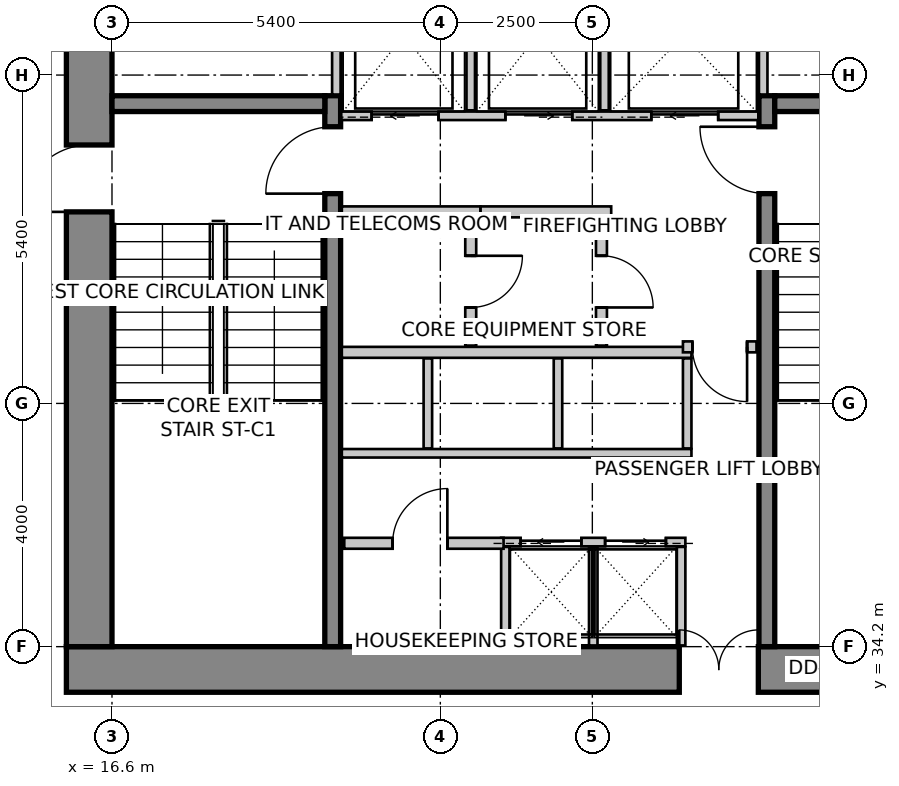
"""IFC4 building model, lengths in metres.
Left out: names, types, materials, properties, quantities, classifications, styles, units other than length and angle.
Written with IfcOpenShell. Run it as: python <this file> out.ifc"""

import sys

from ifc_helpers import new_model, si_unit, direction, frame, frame_2d, origin, place, context, subcontext, project, spatial, rectangle, extrude, source, transform, mapped, element, fill, save


model = new_model("IFC4")
c1 = context("Model", 3, precision=1e-05, world=origin(), true_north=direction((0.0, 1.0)))
c2 = subcontext(c1, "Body", "Model", "MODEL_VIEW")
j1 = project(units=[si_unit("LENGTHUNIT", "METRE"), si_unit("PLANEANGLEUNIT", "RADIAN")], contexts=[c1])
p1 = place(None, origin())
s1 = spatial("IfcSite", under=j1, at=p1, CompositionType="ELEMENT")
p2 = place(p1, origin())
s2 = spatial("IfcBuilding", under=s1, at=p2, CompositionType="ELEMENT")
p3 = place(p2, frame((0.0, 0.0, 168.2)))
s3 = spatial("IfcBuildingStorey", under=s2, at=p3, CompositionType="ELEMENT", Elevation=168.2)
p4 = place(p3, frame((15.85, 33.825, 0.0), z_axis=(0.0, 0.0, 1.0), x_axis=(1.0, 0.0, 0.0)))
e1 = element("IfcWall", 1, at=p4, inside=s3, PredefinedType="SHEAR", context=c2, shape_type="SweptSolid", body=[
    extrude(rectangle(XDim=15.9, YDim=0.75, at=frame_2d((7.95, 0.0))), origin(), (0.0, 0.0, 1.0), 3.6),
])
m1 = source(origin(), c2, "Body", "SweptSolid", [
    extrude(rectangle(XDim=1.3, YDim=2.15, at=frame_2d((0.65, 1.075))), frame((0.0, 0.385, 0.0), z_axis=(0.0, -1.0, 0.0), x_axis=(1.0, 0.0, 0.0)), (0.0, 0.0, 1.0), 0.77),
])
p5 = place(p4, frame((10.08, 0.0, 0.0)))
e2 = element("IfcOpeningElement", 2, at=p5, cuts=e1, PredefinedType="OPENING", context=c2, shape_type="MappedRepresentation", body=[
    mapped(m1, transform((0.0, 0.0, 0.0), scale=1.0)),
])
p6 = place(p3, frame((16.225, 34.2, 0.0), z_axis=(0.0, 0.0, 1.0), x_axis=(0.0, 1.0, 0.0)))
e3 = element("IfcWall", 3, at=p6, inside=s3, PredefinedType="SHEAR", context=c2, shape_type="SweptSolid", body=[
    extrude(rectangle(XDim=11.4, YDim=0.75, at=frame_2d((5.7, 0.0))), origin(), (0.0, 0.0, 1.0), 3.6),
])
m2 = source(origin(), c2, "Body", "SweptSolid", [
    extrude(rectangle(XDim=1.1, YDim=2.15, at=frame_2d((0.55, 1.075))), frame((0.0, 0.385, 0.0), z_axis=(0.0, -1.0, 0.0), x_axis=(1.0, 0.0, 0.0)), (0.0, 0.0, 1.0), 0.77),
])
p7 = place(p6, frame((7.15, 0.0, 0.0)))
e4 = element("IfcOpeningElement", 4, at=p7, cuts=e3, PredefinedType="OPENING", context=c2, shape_type="MappedRepresentation", body=[
    mapped(m2, transform((0.0, 0.0, 0.0), scale=1.0)),
])
p8 = place(p3, frame((20.23, 34.2, 0.0), z_axis=(0.0, 0.0, 1.0), x_axis=(0.0, 1.0, 0.0)))
e5 = element("IfcWall", 5, at=p8, inside=s3, PredefinedType="SHEAR", context=c2, shape_type="SweptSolid", body=[
    extrude(rectangle(XDim=9.06, YDim=0.26, at=frame_2d((4.53, 0.0))), origin(), (0.0, 0.0, 1.0), 3.6),
])
m3 = source(origin(), c2, "Body", "SweptSolid", [
    extrude(rectangle(XDim=1.1, YDim=2.15, at=frame_2d((0.55, 1.075))), frame((0.0, 0.14, 0.0), z_axis=(0.0, -1.0, 0.0), x_axis=(1.0, 0.0, 0.0)), (0.0, 0.0, 1.0), 0.28),
])
p9 = place(p8, frame((7.45, 0.0, 0.0)))
e6 = element("IfcOpeningElement", 6, at=p9, cuts=e5, PredefinedType="OPENING", context=c2, shape_type="MappedRepresentation", body=[
    mapped(m3, transform((0.0, 0.0, 0.0), scale=1.0)),
])
p10 = place(p3, frame((27.37, 34.2, 0.0), z_axis=(0.0, 0.0, 1.0), x_axis=(0.0, 1.0, 0.0)))
e7 = element("IfcWall", 7, at=p10, inside=s3, PredefinedType="SHEAR", context=c2, shape_type="SweptSolid", body=[
    extrude(rectangle(XDim=9.06, YDim=0.26, at=frame_2d((4.53, 0.0))), origin(), (0.0, 0.0, 1.0), 3.6),
])
p11 = place(p10, frame((7.45, 0.0, 0.0)))
e8 = element("IfcOpeningElement", 8, at=p11, cuts=e7, PredefinedType="OPENING", context=c2, shape_type="MappedRepresentation", body=[
    mapped(m3, transform((0.0, 0.0, 0.0), scale=1.0)),
])
for number, where, z_axis, x_axis in (
    (9, (16.6, 43.13, 0.0), (0.0, 0.0, 1.0), (1.0, 0.0, 0.0)),
    (10, (27.5, 43.13, 0.0), (0.0, 0.0, 1.0), (1.0, 0.0, 0.0)),
):
    element("IfcWall", number, at=place(p3, frame(where, z_axis=z_axis, x_axis=x_axis)), inside=s3, PredefinedType="SHEAR", context=c2, shape_type="SweptSolid", body=[
        extrude(rectangle(XDim=3.5, YDim=0.26, at=frame_2d((1.75, 0.0))), origin(), (0.0, 0.0, 1.0), 3.6),
    ])
p12 = place(p3, frame((20.37, 42.93, 0.0), z_axis=(0.0, 0.0, 1.0), x_axis=(1.0, 0.0, 0.0)))
e11 = element("IfcWall", 11, at=p12, inside=s3, PredefinedType="SOLIDWALL", context=c2, shape_type="SweptSolid", body=[
    extrude(rectangle(XDim=6.86, YDim=0.14, at=frame_2d((3.43, 0.0))), origin(), (0.0, 0.0, 1.0), 3.3),
])
m4 = source(origin(), c2, "Body", "SweptSolid", [
    extrude(rectangle(XDim=1.1, YDim=2.15, at=frame_2d((0.55, 1.075))), frame((0.0, 0.08, 0.0), z_axis=(0.0, -1.0, 0.0), x_axis=(1.0, 0.0, 0.0)), (0.0, 0.0, 1.0), 0.16),
])
p13 = place(p12, frame((0.5, 0.0, 0.0)))
e12 = element("IfcOpeningElement", 12, at=p13, cuts=e11, PredefinedType="OPENING", context=c2, shape_type="MappedRepresentation", body=[
    mapped(m4, transform((0.0, 0.0, 0.0), scale=1.0)),
])
p14 = place(p12, frame((2.7, 0.0, 0.0)))
e13 = element("IfcOpeningElement", 13, at=p14, cuts=e11, PredefinedType="OPENING", context=c2, shape_type="MappedRepresentation", body=[
    mapped(m4, transform((0.0, 0.0, 0.0), scale=1.0)),
])
p15 = place(p12, frame((5.1, 0.0, 0.0)))
e14 = element("IfcOpeningElement", 14, at=p15, cuts=e11, PredefinedType="OPENING", context=c2, shape_type="MappedRepresentation", body=[
    mapped(m4, transform((0.0, 0.0, 0.0), scale=1.0)),
])
for number, where, z_axis, x_axis in (
    (15, (20.29, 43.28, 0.0), (0.0, 0.0, 1.0), (0.0, 1.0, 0.0)),
    (16, (27.31, 43.28, 0.0), (0.0, 0.0, 1.0), (0.0, 1.0, 0.0)),
):
    element("IfcWall", number, at=place(p3, frame(where, z_axis=z_axis, x_axis=x_axis)), inside=s3, PredefinedType="SOLIDWALL", context=c2, shape_type="SweptSolid", body=[
        extrude(rectangle(XDim=2.3, YDim=0.14, at=frame_2d((1.15, 0.0))), origin(), (0.0, 0.0, 1.0), 3.3),
    ])
for number, where, z_axis, x_axis in (
    (17, (22.5, 43.02, 0.0), (0.0, 0.0, 1.0), (0.0, 1.0, 0.0)),
    (18, (24.7, 43.02, 0.0), (0.0, 0.0, 1.0), (0.0, 1.0, 0.0)),
):
    element("IfcWall", number, at=place(p3, frame(where, z_axis=z_axis, x_axis=x_axis)), inside=s3, PredefinedType="SOLIDWALL", context=c2, shape_type="SweptSolid", body=[
        extrude(rectangle(XDim=2.56, YDim=0.14, at=frame_2d((1.28, 0.0))), origin(), (0.0, 0.0, 1.0), 3.3),
    ])
p16 = place(p3, frame((23.0, 35.92, 0.0), z_axis=(0.0, 0.0, 1.0), x_axis=(1.0, 0.0, 0.0)))
e19 = element("IfcWall", 19, at=p16, inside=s3, PredefinedType="SOLIDWALL", context=c2, shape_type="SweptSolid", body=[
    extrude(rectangle(XDim=3.03, YDim=0.14, at=frame_2d((1.515, 0.0))), origin(), (0.0, 0.0, 1.0), 3.3),
])
m5 = source(origin(), c2, "Body", "SweptSolid", [
    extrude(rectangle(XDim=1.0, YDim=2.15, at=frame_2d((0.5, 1.075))), frame((0.0, 0.08, 0.0), z_axis=(0.0, -1.0, 0.0), x_axis=(1.0, 0.0, 0.0)), (0.0, 0.0, 1.0), 0.16),
])
p17 = place(p16, frame((0.32, 0.0, 0.0)))
e20 = element("IfcOpeningElement", 20, at=p17, cuts=e19, PredefinedType="OPENING", context=c2, shape_type="MappedRepresentation", body=[
    mapped(m5, transform((0.0, 0.0, 0.0), scale=1.0)),
])
p18 = place(p16, frame((1.71, 0.0, 0.0)))
e21 = element("IfcOpeningElement", 21, at=p18, cuts=e19, PredefinedType="OPENING", context=c2, shape_type="MappedRepresentation", body=[
    mapped(m5, transform((0.0, 0.0, 0.0), scale=1.0)),
])
for number, where, z_axis, x_axis in (
    (22, (25.96, 34.22, 0.0), (0.0, 0.0, 1.0), (0.0, 1.0, 0.0)),
    (23, (23.07, 34.22, 0.0), (0.0, 0.0, 1.0), (0.0, 1.0, 0.0)),
    (24, (24.515, 34.22, 0.0), (0.0, 0.0, 1.0), (0.0, 1.0, 0.0)),
):
    element("IfcWall", number, at=place(p3, frame(where, z_axis=z_axis, x_axis=x_axis)), inside=s3, PredefinedType="SOLIDWALL", context=c2, shape_type="SweptSolid", body=[
        extrude(rectangle(XDim=1.62, YDim=0.14, at=frame_2d((0.81, 0.0))), origin(), (0.0, 0.0, 1.0), 2.592),
    ])
p19 = place(p3, frame((20.38, 37.38, 0.0), z_axis=(0.0, 0.0, 1.0), x_axis=(1.0, 0.0, 0.0)))
e25 = element("IfcWall", 25, at=p19, inside=s3, PredefinedType="SOLIDWALL", context=c2, shape_type="SweptSolid", body=[
    extrude(rectangle(XDim=5.75, YDim=0.14, at=frame_2d((2.875, 0.0))), origin(), (0.0, 0.0, 1.0), 3.3),
])
p20 = place(p3, frame((20.38, 39.04, 0.0), z_axis=(0.0, 0.0, 1.0), x_axis=(1.0, 0.0, 0.0)))
e26 = element("IfcWall", 26, at=p20, inside=s3, PredefinedType="SOLIDWALL", context=c2, shape_type="SweptSolid", body=[
    extrude(rectangle(XDim=5.75, YDim=0.18, at=frame_2d((2.875, 0.0))), origin(), (0.0, 0.0, 1.0), 3.3),
])
for number, where, z_axis, x_axis in (
    (27, (26.06, 37.46, 0.0), (0.0, 0.0, 1.0), (0.0, 1.0, 0.0)),
    (28, (21.795, 37.46, 0.0), (0.0, 0.0, 1.0), (0.0, 1.0, 0.0)),
    (29, (23.935, 37.46, 0.0), (0.0, 0.0, 1.0), (0.0, 1.0, 0.0)),
):
    element("IfcWall", number, at=place(p3, frame(where, z_axis=z_axis, x_axis=x_axis)), inside=s3, PredefinedType="SOLIDWALL", context=c2, shape_type="SweptSolid", body=[
        extrude(rectangle(XDim=1.48, YDim=0.14, at=frame_2d((0.74, 0.0))), origin(), (0.0, 0.0, 1.0), 3.3),
    ])
p21 = place(p3, frame((22.66, 41.35, 0.0), z_axis=(0.0, 0.0, 1.0), x_axis=(-1.0, 0.0, 0.0)))
e30 = element("IfcWall", 30, at=p21, inside=s3, PredefinedType="PARTITIONING", context=c2, shape_type="SweptSolid", body=[
    extrude(rectangle(XDim=2.28, YDim=0.18, at=frame_2d((1.14, 0.0))), origin(), (0.0, 0.0, 1.0), 3.3),
])
p22 = place(p3, frame((24.81, 41.35, 0.0), z_axis=(0.0, 0.0, 1.0), x_axis=(-1.0, 0.0, 0.0)))
e31 = element("IfcWall", 31, at=p22, inside=s3, PredefinedType="PARTITIONING", context=c2, shape_type="SweptSolid", body=[
    extrude(rectangle(XDim=2.148, YDim=0.18, at=frame_2d((1.074, 0.0))), origin(), (0.0, 0.0, 1.0), 3.3),
])
p23 = place(p3, frame((22.5, 41.256, 0.0), z_axis=(0.0, 0.0, 1.0), x_axis=(0.0, -1.0, 0.0)))
e32 = element("IfcWall", 32, at=p23, inside=s3, PredefinedType="PARTITIONING", context=c2, shape_type="SweptSolid", body=[
    extrude(rectangle(XDim=2.106, YDim=0.18, at=frame_2d((1.053, 0.0))), origin(), (0.0, 0.0, 1.0), 3.3),
])
m6 = source(origin(), c2, "Body", "SweptSolid", [
    extrude(rectangle(XDim=0.85, YDim=2.15, at=frame_2d((0.425, 1.075))), frame((0.0, 0.1, 0.0), z_axis=(0.0, -1.0, 0.0), x_axis=(1.0, 0.0, 0.0)), (0.0, 0.0, 1.0), 0.2),
])
p24 = place(p23, frame((0.628, 0.0, 0.0)))
e33 = element("IfcOpeningElement", 33, at=p24, cuts=e32, PredefinedType="OPENING", context=c2, shape_type="MappedRepresentation", body=[
    mapped(m6, transform((0.0, 0.0, 0.0), scale=1.0)),
])
p25 = place(p3, frame((24.65, 41.256, 0.0), z_axis=(0.0, 0.0, 1.0), x_axis=(0.0, -1.0, 0.0)))
e34 = element("IfcWall", 34, at=p25, inside=s3, PredefinedType="PARTITIONING", context=c2, shape_type="SweptSolid", body=[
    extrude(rectangle(XDim=2.106, YDim=0.18, at=frame_2d((1.053, 0.0))), origin(), (0.0, 0.0, 1.0), 3.3),
])
p26 = place(p25, frame((0.628, 0.0, 0.0)))
e35 = element("IfcOpeningElement", 35, at=p26, cuts=e34, PredefinedType="OPENING", context=c2, shape_type="MappedRepresentation", body=[
    mapped(m6, transform((0.0, 0.0, 0.0), scale=1.0)),
])
p27 = place(p3, frame((27.2, 39.13, 0.0), z_axis=(0.0, 0.0, 1.0), x_axis=(-1.0, 0.0, 0.0)))
e36 = element("IfcWall", 36, at=p27, inside=s3, PredefinedType="PARTITIONING", context=c2, shape_type="SweptSolid", body=[
    extrude(rectangle(XDim=1.21, YDim=0.18, at=frame_2d((0.605, 0.0))), origin(), (0.0, 0.0, 1.0), 3.3),
])
m7 = source(origin(), c2, "Body", "SweptSolid", [
    extrude(rectangle(XDim=0.9, YDim=2.15, at=frame_2d((0.45, 1.075))), frame((0.0, 0.1, 0.0), z_axis=(0.0, -1.0, 0.0), x_axis=(1.0, 0.0, 0.0)), (0.0, 0.0, 1.0), 0.2),
])
p28 = place(p27, frame((0.155, 0.0, 0.0)))
e37 = element("IfcOpeningElement", 37, at=p28, cuts=e36, PredefinedType="OPENING", context=c2, shape_type="MappedRepresentation", body=[
    mapped(m7, transform((0.0, 0.0, 0.0), scale=1.0)),
])
p29 = place(p3, frame((20.42, 35.9, 0.0), z_axis=(0.0, 0.0, 1.0), x_axis=(1.0, 0.0, 0.0)))
e38 = element("IfcWall", 38, at=p29, inside=s3, PredefinedType="PARTITIONING", context=c2, shape_type="SweptSolid", body=[
    extrude(rectangle(XDim=2.62, YDim=0.18, at=frame_2d((1.31, 0.0))), origin(), (0.0, 0.0, 1.0), 3.3),
])
p30 = place(p29, frame((0.796, 0.0, 0.0)))
e39 = element("IfcOpeningElement", 39, at=p30, cuts=e38, PredefinedType="OPENING", context=c2, shape_type="MappedRepresentation", body=[
    mapped(m7, transform((0.0, 0.0, 0.0), scale=1.0)),
])
m8 = source(origin(), c2, "Body", "SweptSolid", [
    extrude(rectangle(XDim=1.1, YDim=2.15, at=frame_2d((0.55, 1.075))), frame((0.0, 0.025, 0.0), z_axis=(0.0, -1.0, 0.0), x_axis=(1.0, 0.0, 0.0)), (0.0, 0.0, 1.0), 0.05),
])
p31 = place(p13, origin())
e40 = element("IfcDoor", 40, at=p31, inside=s3, OperationType="SLIDING_TO_LEFT", PredefinedType="DOOR", context=c2, shape_type="MappedRepresentation", body=[
    mapped(m8, transform((0.0, 0.0, 0.0), scale=1.0)),
])
fill(e12, e40)
p32 = place(p14, origin())
e41 = element("IfcDoor", 41, at=p32, inside=s3, OperationType="SLIDING_TO_RIGHT", PredefinedType="DOOR", context=c2, shape_type="MappedRepresentation", body=[
    mapped(m8, transform((0.0, 0.0, 0.0), scale=1.0)),
])
fill(e13, e41)
m9 = source(origin(), c2, "Body", "SweptSolid", [
    extrude(rectangle(XDim=1.1, YDim=2.15, at=frame_2d((0.55, 1.075))), frame((0.0, 0.025, 0.0), z_axis=(0.0, -1.0, 0.0), x_axis=(1.0, 0.0, 0.0)), (0.0, 0.0, 1.0), 0.05),
])
p33 = place(p15, origin())
e42 = element("IfcDoor", 42, at=p33, inside=s3, OperationType="SLIDING_TO_LEFT", PredefinedType="DOOR", context=c2, shape_type="MappedRepresentation", body=[
    mapped(m9, transform((0.0, 0.0, 0.0), scale=1.0)),
])
fill(e14, e42)
m10 = source(origin(), c2, "Body", "SweptSolid", [
    extrude(rectangle(XDim=1.0, YDim=2.15, at=frame_2d((0.5, 1.075))), frame((0.0, 0.025, 0.0), z_axis=(0.0, -1.0, 0.0), x_axis=(1.0, 0.0, 0.0)), (0.0, 0.0, 1.0), 0.05),
])
p34 = place(p17, origin())
e43 = element("IfcDoor", 43, at=p34, inside=s3, OperationType="SLIDING_TO_LEFT", PredefinedType="DOOR", context=c2, shape_type="MappedRepresentation", body=[
    mapped(m10, transform((0.0, 0.0, 0.0), scale=1.0)),
])
fill(e20, e43)
p35 = place(p18, origin())
e44 = element("IfcDoor", 44, at=p35, inside=s3, OperationType="SLIDING_TO_RIGHT", PredefinedType="DOOR", context=c2, shape_type="MappedRepresentation", body=[
    mapped(m10, transform((0.0, 0.0, 0.0), scale=1.0)),
])
fill(e21, e44)
m11 = source(origin(), c2, "Body", "SweptSolid", [
    extrude(rectangle(XDim=1.1, YDim=2.15, at=frame_2d((0.55, 1.075))), frame((0.0, 0.025, 0.0), z_axis=(0.0, -1.0, 0.0), x_axis=(1.0, 0.0, 0.0)), (0.0, 0.0, 1.0), 0.05),
])
p36 = place(p9, origin())
e45 = element("IfcDoor", 45, at=p36, inside=s3, OperationType="SINGLE_SWING_LEFT", PredefinedType="DOOR", context=c2, shape_type="MappedRepresentation", body=[
    mapped(m11, transform((0.0, 0.0, 0.0), scale=1.0)),
])
fill(e6, e45)
p37 = place(p11, origin())
e46 = element("IfcDoor", 46, at=p37, inside=s3, OperationType="SINGLE_SWING_RIGHT", PredefinedType="DOOR", context=c2, shape_type="MappedRepresentation", body=[
    mapped(m11, transform((0.0, 0.0, 0.0), scale=1.0)),
])
fill(e8, e46)
p38 = place(p7, origin())
e47 = element("IfcDoor", 47, at=p38, inside=s3, OperationType="SINGLE_SWING_LEFT", PredefinedType="DOOR", context=c2, shape_type="MappedRepresentation", body=[
    mapped(m11, transform((0.0, 0.0, 0.0), scale=1.0)),
])
fill(e4, e47)
m12 = source(origin(), c2, "Body", "SweptSolid", [
    extrude(rectangle(XDim=1.3, YDim=2.15, at=frame_2d((0.65, 1.075))), frame((0.0, 0.025, 0.0), z_axis=(0.0, -1.0, 0.0), x_axis=(1.0, 0.0, 0.0)), (0.0, 0.0, 1.0), 0.05),
])
p39 = place(p5, origin())
e48 = element("IfcDoor", 48, at=p39, inside=s3, OperationType="DOUBLE_DOOR_SINGLE_SWING", PredefinedType="DOOR", context=c2, shape_type="MappedRepresentation", body=[
    mapped(m12, transform((0.0, 0.0, 0.0), scale=1.0)),
])
fill(e2, e48)
m13 = source(origin(), c2, "Body", "SweptSolid", [
    extrude(rectangle(XDim=0.85, YDim=2.15, at=frame_2d((0.425, 1.075))), frame((0.0, 0.025, 0.0), z_axis=(0.0, -1.0, 0.0), x_axis=(1.0, 0.0, 0.0)), (0.0, 0.0, 1.0), 0.05),
])
p40 = place(p24, origin())
e49 = element("IfcDoor", 49, at=p40, inside=s3, OperationType="SINGLE_SWING_LEFT", PredefinedType="DOOR", context=c2, shape_type="MappedRepresentation", body=[
    mapped(m13, transform((0.0, 0.0, 0.0), scale=1.0)),
])
fill(e33, e49)
p41 = place(p26, origin())
e50 = element("IfcDoor", 50, at=p41, inside=s3, OperationType="SINGLE_SWING_RIGHT", PredefinedType="DOOR", context=c2, shape_type="MappedRepresentation", body=[
    mapped(m13, transform((0.0, 0.0, 0.0), scale=1.0)),
])
fill(e35, e50)
m14 = source(origin(), c2, "Body", "SweptSolid", [
    extrude(rectangle(XDim=0.9, YDim=2.15, at=frame_2d((0.45, 1.075))), frame((0.0, 0.025, 0.0), z_axis=(0.0, -1.0, 0.0), x_axis=(1.0, 0.0, 0.0)), (0.0, 0.0, 1.0), 0.05),
])
p42 = place(p28, origin())
e51 = element("IfcDoor", 51, at=p42, inside=s3, OperationType="SINGLE_SWING_LEFT", PredefinedType="DOOR", context=c2, shape_type="MappedRepresentation", body=[
    mapped(m14, transform((0.0, 0.0, 0.0), scale=1.0)),
])
fill(e37, e51)
p43 = place(p30, origin())
e52 = element("IfcDoor", 52, at=p43, inside=s3, OperationType="SINGLE_SWING_RIGHT", PredefinedType="DOOR", context=c2, shape_type="MappedRepresentation", body=[
    mapped(m14, transform((0.0, 0.0, 0.0), scale=1.0)),
])
fill(e39, e52)
save(model, sys.argv[1])
